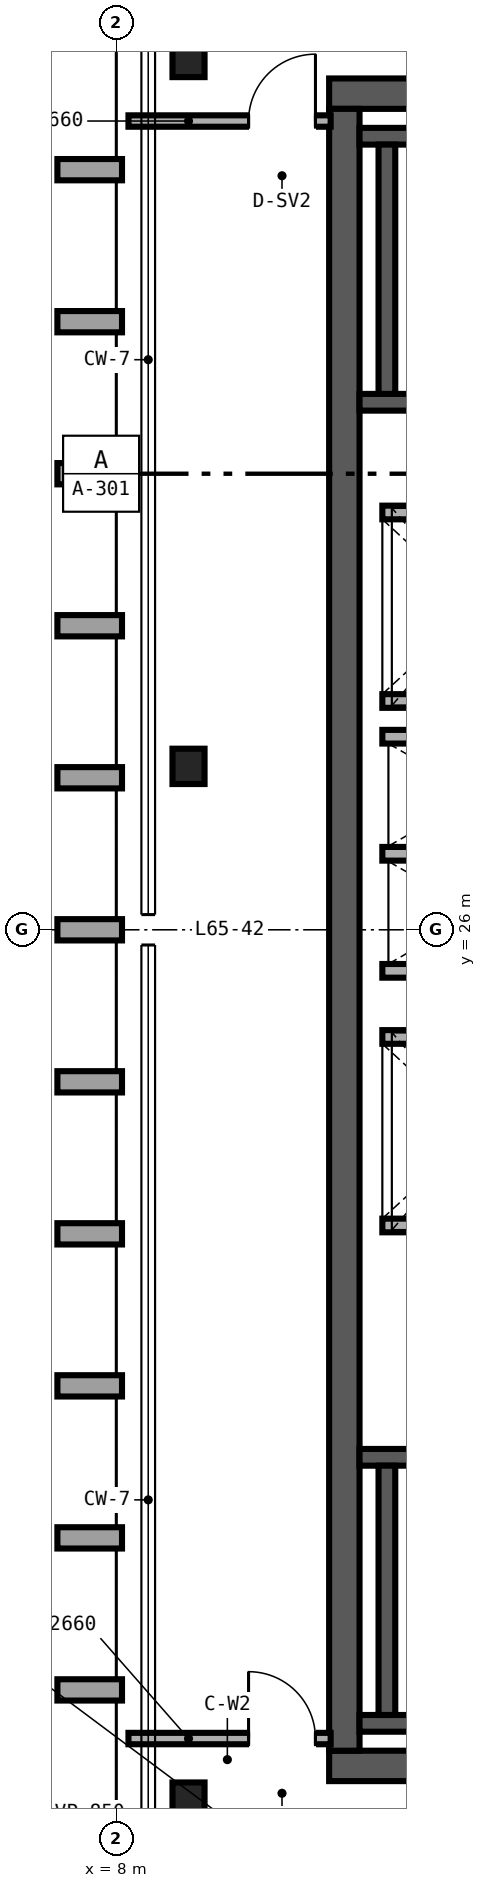
"""IFC4 building model, lengths in metres.
Left out: names, types, materials, properties, quantities, classifications, styles, units other than length and angle.
Written with IfcOpenShell. Run it as: python <this file> out.ifc"""

import sys

from ifc_helpers import new_model, si_unit, direction, frame, frame_2d, origin, origin_2d, place, context, subcontext, project, spatial, rectangle, i_section, extrude, source, transform, mapped, element, fill, save


model = new_model("IFC4")
c1 = context("Model", 3, precision=1e-05, world=origin(), true_north=direction((0.0, 1.0)))
c2 = subcontext(c1, "Body", "Model", "MODEL_VIEW")
j1 = project(units=[si_unit("LENGTHUNIT", "METRE"), si_unit("PLANEANGLEUNIT", "RADIAN")], contexts=[c1])
p1 = place(None, origin())
s1 = spatial("IfcSite", under=j1, at=p1, CompositionType="ELEMENT")
p2 = place(p1, origin())
s2 = spatial("IfcBuilding", under=s1, at=p2, CompositionType="ELEMENT")
p3 = place(p2, frame((0.0, 0.0, 258.0)))
s3 = spatial("IfcBuildingStorey", under=s2, at=p3, CompositionType="ELEMENT", Elevation=258.0)
p4 = place(p3, frame((10.8, 15.0, 0.0), z_axis=(0.0, 0.0, 1.0), x_axis=(1.0, 0.0, 0.0)))
e1 = element("IfcWall", 1, at=p4, inside=s3, PredefinedType="SHEAR", context=c2, shape_type="SweptSolid", body=[
    extrude(rectangle(XDim=12.4, YDim=0.4, at=frame_2d((6.2, 0.0))), origin(), (0.0, 0.0, 1.0), 3.38),
])
p5 = place(p4, frame((10.1, 0.0, 0.0)))
e2 = element("IfcOpeningElement", 2, at=p5, cuts=e1, PredefinedType="OPENING", context=c2, shape_type="SweptSolid", body=[
    extrude(rectangle(XDim=1.0, YDim=2.15, at=frame_2d((0.5, 1.075))), frame((0.0, 0.21, 0.0), z_axis=(0.0, -1.0, 0.0), x_axis=(1.0, 0.0, 0.0)), (0.0, 0.0, 1.0), 0.42),
])
p6 = place(p3, frame((10.8, 37.0, 0.0), z_axis=(0.0, 0.0, 1.0), x_axis=(1.0, 0.0, 0.0)))
e3 = element("IfcWall", 3, at=p6, inside=s3, PredefinedType="SHEAR", context=c2, shape_type="SweptSolid", body=[
    extrude(rectangle(XDim=12.4, YDim=0.4, at=frame_2d((6.2, 0.0))), origin(), (0.0, 0.0, 1.0), 3.38),
])
p7 = place(p6, frame((8.78, 0.0, 0.0)))
e4 = element("IfcOpeningElement", 4, at=p7, cuts=e3, PredefinedType="OPENING", context=c2, shape_type="SweptSolid", body=[
    extrude(rectangle(XDim=1.0, YDim=2.15, at=frame_2d((0.5, 1.075))), frame((0.0, 0.21, 0.0), z_axis=(0.0, -1.0, 0.0), x_axis=(1.0, 0.0, 0.0)), (0.0, 0.0, 1.0), 0.42),
])
p8 = place(p3, frame((11.0, 15.2, 0.0), z_axis=(0.0, 0.0, 1.0), x_axis=(0.0, 1.0, 0.0)))
e5 = element("IfcWall", 5, at=p8, inside=s3, PredefinedType="SHEAR", context=c2, shape_type="SweptSolid", body=[
    extrude(rectangle(XDim=21.6, YDim=0.4, at=frame_2d((10.8, 0.0))), origin(), (0.0, 0.0, 1.0), 3.38),
])
p9 = place(p3, frame((11.2, 15.56, 0.0), z_axis=(0.0, 0.0, 1.0), x_axis=(1.0, 0.0, 0.0)))
e6 = element("IfcWall", 6, at=p9, inside=s3, PredefinedType="SHEAR", context=c2, shape_type="SweptSolid", body=[
    extrude(rectangle(XDim=8.11, YDim=0.22, at=frame_2d((4.055, 0.0))), origin(), (0.0, 0.0, 1.0), 3.4),
])
p10 = place(p3, frame((11.2, 19.06, 0.0), z_axis=(0.0, 0.0, 1.0), x_axis=(1.0, 0.0, 0.0)))
e7 = element("IfcWall", 7, at=p10, inside=s3, PredefinedType="SHEAR", context=c2, shape_type="SweptSolid", body=[
    extrude(rectangle(XDim=8.11, YDim=0.22, at=frame_2d((4.055, 0.0))), origin(), (0.0, 0.0, 1.0), 3.4),
])
p11 = place(p10, frame((0.72, 0.0, 0.0)))
e8 = element("IfcOpeningElement", 8, at=p11, cuts=e7, PredefinedType="OPENING", context=c2, shape_type="SweptSolid", body=[
    extrude(rectangle(XDim=1.05, YDim=2.15, at=frame_2d((0.525, 1.075))), frame((0.0, 0.12, 0.0), z_axis=(0.0, -1.0, 0.0), x_axis=(1.0, 0.0, 0.0)), (0.0, 0.0, 1.0), 0.24),
])
p12 = place(p3, frame((11.56, 15.67, 0.0), z_axis=(0.0, 0.0, 1.0), x_axis=(0.0, 1.0, 0.0)))
e9 = element("IfcWall", 9, at=p12, inside=s3, PredefinedType="SHEAR", context=c2, shape_type="SweptSolid", body=[
    extrude(rectangle(XDim=3.28, YDim=0.22, at=frame_2d((1.64, 0.0))), origin(), (0.0, 0.0, 1.0), 3.4),
])
p13 = place(p3, frame((11.2, 32.94, 0.0), z_axis=(0.0, 0.0, 1.0), x_axis=(1.0, 0.0, 0.0)))
e10 = element("IfcWall", 10, at=p13, inside=s3, PredefinedType="SHEAR", context=c2, shape_type="SweptSolid", body=[
    extrude(rectangle(XDim=8.11, YDim=0.22, at=frame_2d((4.055, 0.0))), origin(), (0.0, 0.0, 1.0), 3.4),
])
p14 = place(p13, frame((0.72, 0.0, 0.0)))
e11 = element("IfcOpeningElement", 11, at=p14, cuts=e10, PredefinedType="OPENING", context=c2, shape_type="SweptSolid", body=[
    extrude(rectangle(XDim=1.05, YDim=2.15, at=frame_2d((0.525, 1.075))), frame((0.0, 0.12, 0.0), z_axis=(0.0, -1.0, 0.0), x_axis=(1.0, 0.0, 0.0)), (0.0, 0.0, 1.0), 0.24),
])
p15 = place(p3, frame((11.2, 36.44, 0.0), z_axis=(0.0, 0.0, 1.0), x_axis=(1.0, 0.0, 0.0)))
e12 = element("IfcWall", 12, at=p15, inside=s3, PredefinedType="SHEAR", context=c2, shape_type="SweptSolid", body=[
    extrude(rectangle(XDim=8.11, YDim=0.22, at=frame_2d((4.055, 0.0))), origin(), (0.0, 0.0, 1.0), 3.4),
])
p16 = place(p3, frame((11.56, 33.05, 0.0), z_axis=(0.0, 0.0, 1.0), x_axis=(0.0, 1.0, 0.0)))
e13 = element("IfcWall", 13, at=p16, inside=s3, PredefinedType="SHEAR", context=c2, shape_type="SweptSolid", body=[
    extrude(rectangle(XDim=3.28, YDim=0.22, at=frame_2d((1.64, 0.0))), origin(), (0.0, 0.0, 1.0), 3.4),
])
m1 = source(origin(), c2, "Body", "SweptSolid", [
    extrude(i_section(OverallWidth=0.422, OverallDepth=0.465, WebThickness=0.045, FlangeThickness=0.073, FilletRadius=0.025, at=origin_2d()), origin(), (0.0, 0.0, 1.0), 3.38),
])
for number, where, z_axis, x_axis in (
    (14, (8.95, 14.55, 0.0), (0.0, 0.0, 1.0), (1.0, 0.0, 0.0)),
    (15, (8.95, 28.15, 0.0), (0.0, 0.0, 1.0), (1.0, 0.0, 0.0)),
    (16, (8.95, 37.45, 0.0), (0.0, 0.0, 1.0), (1.0, 0.0, 0.0)),
):
    element("IfcColumn", number, at=place(p3, frame(where, z_axis=z_axis, x_axis=x_axis)), inside=s3, PredefinedType="COLUMN", context=c2, shape_type="MappedRepresentation", body=[
        mapped(m1, transform((0.0, 0.0, 0.0), scale=1.0)),
    ])
for number, where, z_axis, x_axis in (
    (17, (11.5, 22.11, 0.0), (0.0, 0.0, 1.0), (1.0, 0.0, 0.0)),
    (18, (11.5, 24.59, 0.0), (0.0, 0.0, 1.0), (1.0, 0.0, 0.0)),
    (19, (11.5, 29.01, 0.0), (0.0, 0.0, 1.0), (1.0, 0.0, 0.0)),
    (20, (11.5, 31.49, 0.0), (0.0, 0.0, 1.0), (1.0, 0.0, 0.0)),
):
    element("IfcWall", number, at=place(p3, frame(where, z_axis=z_axis, x_axis=x_axis)), inside=s3, PredefinedType="SOLIDWALL", context=c2, shape_type="SweptSolid", body=[
        extrude(rectangle(XDim=2.5, YDim=0.18, at=frame_2d((1.25, 0.0))), origin(), (0.0, 0.0, 1.0), 3.38),
    ])
for number, where, z_axis, x_axis in (
    (21, (11.5, 25.46, 0.0), (0.0, 0.0, 1.0), (1.0, 0.0, 0.0)),
    (22, (11.5, 27.0, 0.0), (0.0, 0.0, 1.0), (1.0, 0.0, 0.0)),
    (23, (11.5, 28.54, 0.0), (0.0, 0.0, 1.0), (1.0, 0.0, 0.0)),
):
    element("IfcWall", number, at=place(p3, frame(where, z_axis=z_axis, x_axis=x_axis)), inside=s3, PredefinedType="SOLIDWALL", context=c2, shape_type="SweptSolid", body=[
        extrude(rectangle(XDim=2.51, YDim=0.18, at=frame_2d((1.255, 0.0))), origin(), (0.0, 0.0, 1.0), 3.38),
    ])
p17 = place(p3, frame((8.16, 15.36, 0.0), z_axis=(0.0, 0.0, 1.0), x_axis=(1.0, 0.0, 0.0)))
e24 = element("IfcWall", 24, at=p17, inside=s3, PredefinedType="PARTITIONING", context=c2, shape_type="SweptSolid", body=[
    extrude(rectangle(XDim=2.66, YDim=0.15, at=frame_2d((1.33, 0.0))), origin(), (0.0, 0.0, 1.0), 2.601),
])
p18 = place(p17, frame((1.58, 0.0, 0.0)))
e25 = element("IfcOpeningElement", 25, at=p18, cuts=e24, PredefinedType="OPENING", context=c2, shape_type="SweptSolid", body=[
    extrude(rectangle(XDim=0.88, YDim=2.15, at=frame_2d((0.44, 1.075))), frame((0.0, 0.085, 0.0), z_axis=(0.0, -1.0, 0.0), x_axis=(1.0, 0.0, 0.0)), (0.0, 0.0, 1.0), 0.17),
])
p19 = place(p3, frame((8.16, 36.64, 0.0), z_axis=(0.0, 0.0, 1.0), x_axis=(1.0, 0.0, 0.0)))
e26 = element("IfcWall", 26, at=p19, inside=s3, PredefinedType="PARTITIONING", context=c2, shape_type="SweptSolid", body=[
    extrude(rectangle(XDim=2.66, YDim=0.15, at=frame_2d((1.33, 0.0))), origin(), (0.0, 0.0, 1.0), 2.763),
])
p20 = place(p19, frame((1.58, 0.0, 0.0)))
e27 = element("IfcOpeningElement", 27, at=p20, cuts=e26, PredefinedType="OPENING", context=c2, shape_type="SweptSolid", body=[
    extrude(rectangle(XDim=0.88, YDim=2.15, at=frame_2d((0.44, 1.075))), frame((0.0, 0.085, 0.0), z_axis=(0.0, -1.0, 0.0), x_axis=(1.0, 0.0, 0.0)), (0.0, 0.0, 1.0), 0.17),
])
m2 = source(origin(), c2, "Body", "SweptSolid", [
    extrude(rectangle(XDim=0.88, YDim=2.15, at=frame_2d((0.44, 1.075))), frame((0.0, 0.025, 0.0), z_axis=(0.0, -1.0, 0.0), x_axis=(1.0, 0.0, 0.0)), (0.0, 0.0, 1.0), 0.05),
])
p21 = place(p18, origin())
e28 = element("IfcDoor", 28, at=p21, inside=s3, OperationType="SINGLE_SWING_LEFT", PredefinedType="DOOR", context=c2, shape_type="MappedRepresentation", body=[
    mapped(m2, transform((0.0, 0.0, 0.0), scale=1.0)),
])
fill(e25, e28)
p22 = place(p20, origin())
e29 = element("IfcDoor", 29, at=p22, inside=s3, OperationType="SINGLE_SWING_RIGHT", PredefinedType="DOOR", context=c2, shape_type="MappedRepresentation", body=[
    mapped(m2, transform((0.0, 0.0, 0.0), scale=1.0)),
])
fill(e27, e29)
save(model, sys.argv[1])
